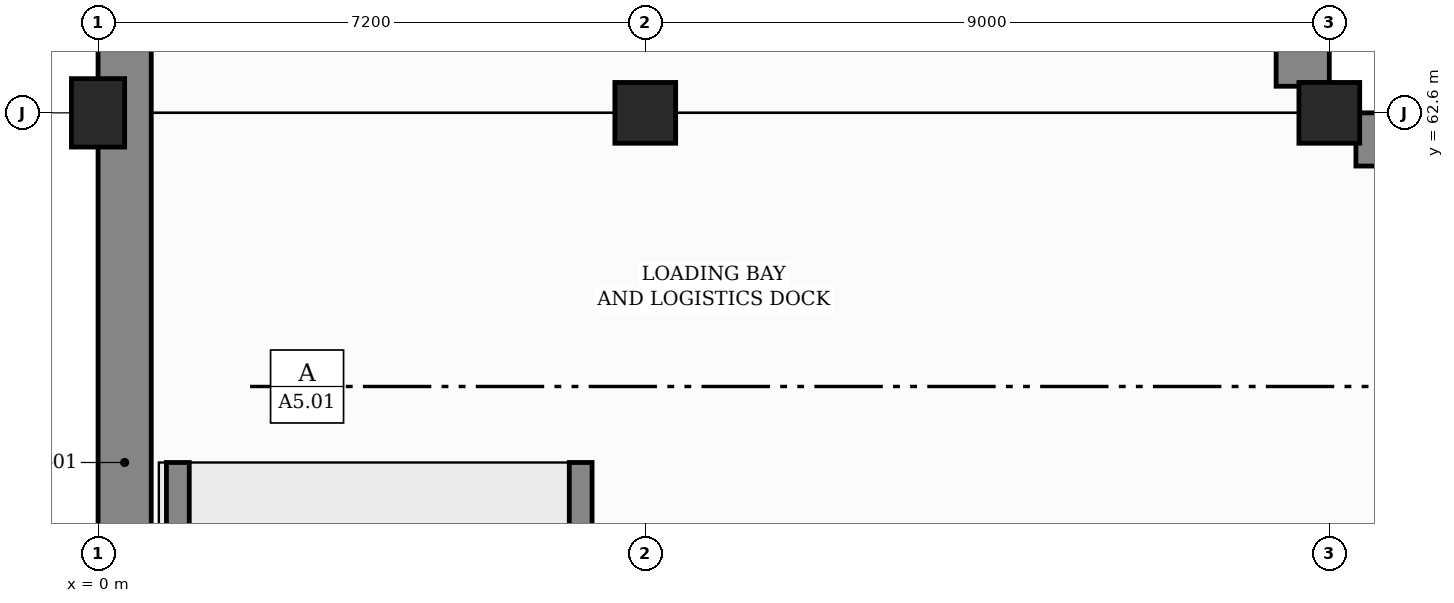
"""IFC4 building model, lengths in metres.
Left out: names, types, materials, properties, quantities, classifications, styles, units other than length and angle.
Written with IfcOpenShell. Run it as: python <this file> out.ifc"""

import sys

from ifc_helpers import new_model, si_unit, direction, frame, frame_2d, origin, origin_2d, place, context, subcontext, project, spatial, rectangle, extrude, element, save


model = new_model("IFC4")
c1 = context("Model", 3, precision=1e-05, world=origin(), true_north=direction((0.0, 1.0)))
c2 = subcontext(c1, "Body", "Model", "MODEL_VIEW")
j1 = project(units=[si_unit("LENGTHUNIT", "METRE"), si_unit("PLANEANGLEUNIT", "RADIAN")], contexts=[c1])
p1 = place(None, origin())
s1 = spatial("IfcSite", under=j1, at=p1, CompositionType="ELEMENT")
p2 = place(p1, origin())
s2 = spatial("IfcBuilding", under=s1, at=p2, CompositionType="ELEMENT")
p3 = place(p2, frame((0.0, 0.0, -4.2)))
s3 = spatial("IfcBuildingStorey", under=s2, at=p3, CompositionType="ELEMENT", Elevation=-4.2)
p4 = place(p3, frame((0.0, 62.6, 0.0), z_axis=(0.0, 0.0, 1.0), x_axis=(1.0, 0.0, 0.0)))
e1 = element("IfcColumn", 1, at=p4, inside=s3, PredefinedType="COLUMN", context=c2, shape_type="SweptSolid", body=[
    extrude(rectangle(XDim=0.7, YDim=0.9, at=origin_2d()), origin(), (0.0, 0.0, 1.0), 4.2),
])
for number, where, z_axis, x_axis in (
    (2, (7.2, 62.6, 0.0), (0.0, 0.0, 1.0), (1.0, 0.0, 0.0)),
    (3, (16.2, 62.6, 0.0), (0.0, 0.0, 1.0), (1.0, 0.0, 0.0)),
):
    element("IfcColumn", number, at=place(p3, frame(where, z_axis=z_axis, x_axis=x_axis)), inside=s3, PredefinedType="COLUMN", context=c2, shape_type="SweptSolid", body=[
        extrude(rectangle(XDim=0.8, YDim=0.8, at=origin_2d()), origin(), (0.0, 0.0, 1.0), 4.2),
    ])
p5 = place(p3, frame((0.35, 0.35, 0.0), z_axis=(0.0, 0.0, 1.0), x_axis=(0.0, 1.0, 0.0)))
e4 = element("IfcWall", 4, at=p5, inside=s3, PredefinedType="SOLIDWALL", context=c2, shape_type="SweptSolid", body=[
    extrude(rectangle(XDim=115.3, YDim=0.7, at=frame_2d((57.65, 0.0))), origin(), (0.0, 0.0, 1.0), 3.84),
])
p6 = place(p3, frame((15.85, 101.85, 0.0), z_axis=(0.0, 0.0, 1.0), x_axis=(0.0, -1.0, 0.0)))
e5 = element("IfcWall", 5, at=p6, inside=s3, PredefinedType="SOLIDWALL", context=c2, shape_type="SweptSolid", body=[
    extrude(rectangle(XDim=38.9, YDim=0.7, at=frame_2d((19.45, 0.0))), origin(), (0.0, 0.0, 1.0), 3.84),
])
p7 = place(p3, frame((16.55, 62.25, 0.0), z_axis=(0.0, 0.0, 1.0), x_axis=(1.0, 0.0, 0.0)))
e6 = element("IfcWall", 6, at=p7, inside=s3, PredefinedType="SOLIDWALL", context=c2, shape_type="SweptSolid", body=[
    extrude(rectangle(XDim=8.3, YDim=0.7, at=frame_2d((4.15, 0.0))), origin(), (0.0, 0.0, 1.0), 3.84),
])
for number, where, z_axis, x_axis in (
    (7, (1.05, 22.0, 0.0), (0.0, 0.0, 1.0), (0.0, 1.0, 0.0)),
    (8, (6.35, 22.0, 0.0), (0.0, 0.0, 1.0), (0.0, 1.0, 0.0)),
):
    element("IfcWall", number, at=place(p3, frame(where, z_axis=z_axis, x_axis=x_axis)), inside=s3, PredefinedType="SHEAR", context=c2, shape_type="SweptSolid", body=[
        extrude(rectangle(XDim=36.0, YDim=0.3, at=frame_2d((18.0, 0.0))), origin(), (0.0, 0.0, 1.0), 3.95),
    ])
save(model, sys.argv[1])
